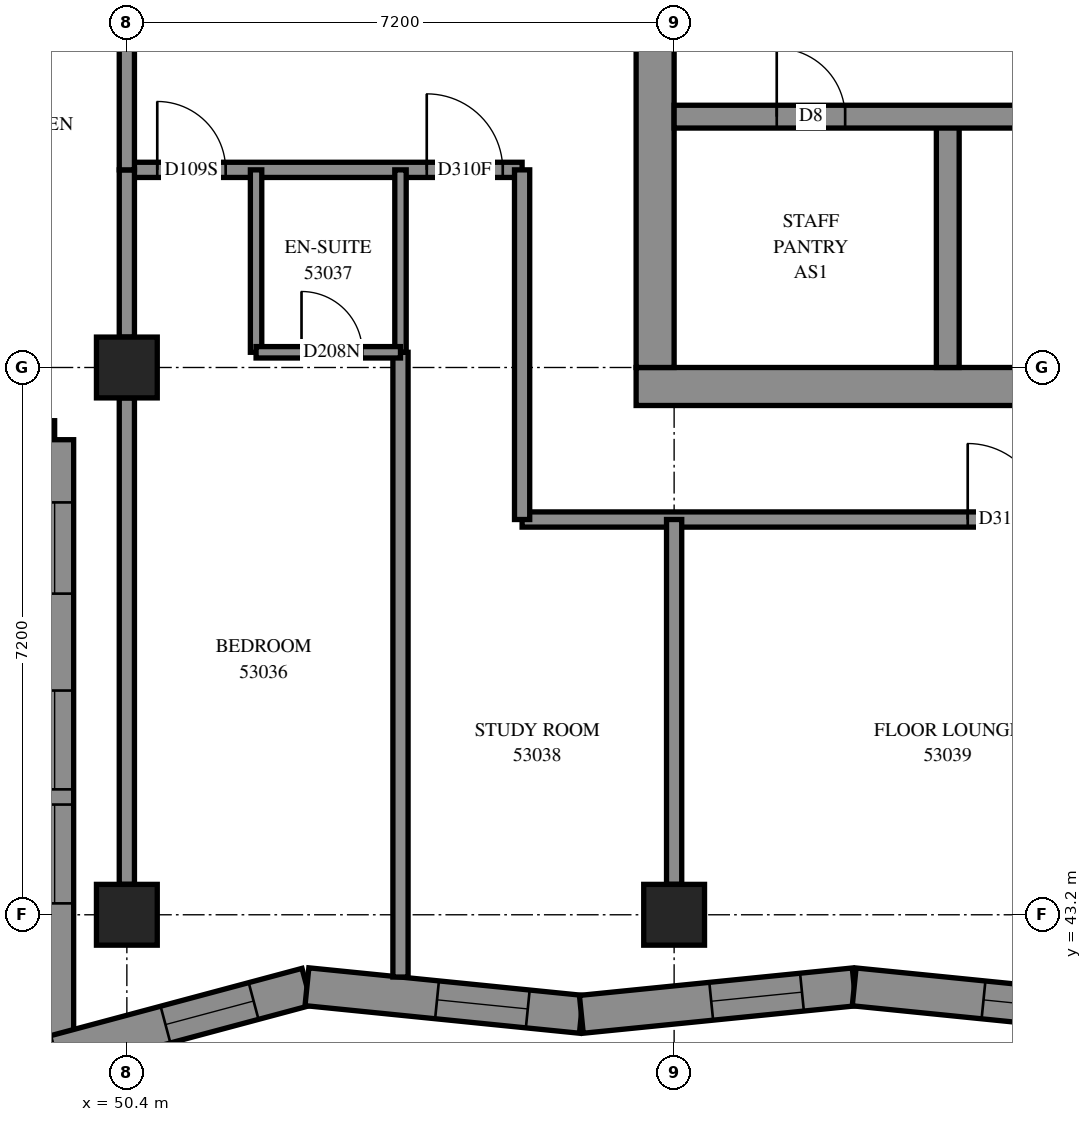
"""IFC4 building model, lengths in metres.
Left out: names, types, materials, properties, quantities, classifications, styles, units other than length and angle.
Written with IfcOpenShell. Run it as: python <this file> out.ifc"""

import sys

from ifc_helpers import new_model, si_unit, direction, frame, frame_2d, origin, origin_2d, place, context, subcontext, project, spatial, polyline, rectangle, outline, extrude, element, fill, save


model = new_model("IFC4")
c1 = context("Model", 3, precision=1e-05, world=origin(), true_north=direction((0.0, 1.0)))
c2 = subcontext(c1, "Body", "Model", "MODEL_VIEW")
j1 = project(units=[si_unit("LENGTHUNIT", "METRE"), si_unit("PLANEANGLEUNIT", "RADIAN")], contexts=[c1])
p1 = place(None, origin())
s1 = spatial("IfcSite", under=j1, at=p1, CompositionType="ELEMENT")
p2 = place(p1, origin())
s2 = spatial("IfcBuilding", under=s1, at=p2, CompositionType="ELEMENT")
p3 = place(p2, frame((0.0, 0.0, 196.4)))
s3 = spatial("IfcBuildingStorey", under=s2, at=p3, CompositionType="ELEMENT", Elevation=196.4)
for number, where, z_axis, x_axis in (
    (1, (50.4, 43.2, 0.0), (0.0, 0.0, 1.0), (1.0, 0.0, 0.0)),
    (2, (50.4, 50.4, 0.0), (0.0, 0.0, 1.0), (1.0, 0.0, 0.0)),
    (3, (57.6, 43.2, 0.0), (0.0, 0.0, 1.0), (1.0, 0.0, 0.0)),
):
    element("IfcColumn", number, at=place(p3, frame(where, z_axis=z_axis, x_axis=x_axis)), inside=s3, PredefinedType="COLUMN", context=c2, shape_type="SweptSolid", body=[
        extrude(rectangle(XDim=0.8, YDim=0.8, at=origin_2d()), origin(), (0.0, 0.0, 1.0), 3.1),
    ])
p4 = place(p3, frame((57.1, 50.15, -0.3), z_axis=(0.0, 0.0, 1.0), x_axis=(1.0, 0.0, 0.0)))
e4 = element("IfcWall", 4, at=p4, inside=s3, PredefinedType="SHEAR", context=c2, shape_type="SweptSolid", body=[
    extrude(rectangle(XDim=15.4, YDim=0.5, at=frame_2d((7.7, 0.0))), origin(), (0.0, 0.0, 1.0), 2.7),
])
p5 = place(p3, frame((57.35, 50.4, -0.3), z_axis=(0.0, 0.0, 1.0), x_axis=(0.0, 1.0, 0.0)))
e5 = element("IfcWall", 5, at=p5, inside=s3, PredefinedType="SHEAR", context=c2, shape_type="SweptSolid", body=[
    extrude(rectangle(XDim=14.4, YDim=0.5, at=frame_2d((7.2, 0.0))), origin(), (0.0, 0.0, 1.0), 2.7),
])
p6 = place(p5, frame((4.55, 0.0, 0.3)))
e6 = element("IfcOpeningElement", 6, at=p6, cuts=e5, PredefinedType="OPENING", context=c2, shape_type="SweptSolid", body=[
    extrude(rectangle(XDim=1.1, YDim=2.1, at=frame_2d((0.55, 1.05))), frame((0.0, 0.26, 0.0), z_axis=(0.0, -1.0, 0.0), x_axis=(1.0, 0.0, 0.0)), (0.0, 0.0, 1.0), 0.52),
])
p7 = place(p5, frame((11.35, 0.0, 0.3)))
e7 = element("IfcOpeningElement", 7, at=p7, cuts=e5, PredefinedType="OPENING", context=c2, shape_type="SweptSolid", body=[
    extrude(rectangle(XDim=1.1, YDim=2.1, at=frame_2d((0.55, 1.05))), frame((0.0, 0.26, 0.0), z_axis=(0.0, -1.0, 0.0), x_axis=(1.0, 0.0, 0.0)), (0.0, 0.0, 1.0), 0.52),
])
p8 = place(p3, frame((61.2, 50.4, 0.0), z_axis=(0.0, 0.0, 1.0), x_axis=(0.0, 1.0, 0.0)))
e8 = element("IfcWall", 8, at=p8, inside=s3, PredefinedType="SOLIDWALL", context=c2, shape_type="SweptSolid", body=[
    extrude(rectangle(XDim=3.3, YDim=0.3, at=frame_2d((1.65, 0.0))), origin(), (0.0, 0.0, 1.0), 3.1),
])
p9 = place(p3, frame((57.6, 53.7, 0.0), z_axis=(0.0, 0.0, 1.0), x_axis=(1.0, 0.0, 0.0)))
e9 = element("IfcWall", 9, at=p9, inside=s3, PredefinedType="SOLIDWALL", context=c2, shape_type="SweptSolid", body=[
    extrude(rectangle(XDim=14.4, YDim=0.3, at=frame_2d((7.2, 0.0))), origin(), (0.0, 0.0, 1.0), 3.1),
])
p10 = place(p9, frame((1.35, 0.0, 0.0)))
e10 = element("IfcOpeningElement", 10, at=p10, cuts=e9, PredefinedType="OPENING", context=c2, shape_type="SweptSolid", body=[
    extrude(rectangle(XDim=0.9, YDim=2.1, at=frame_2d((0.45, 1.05))), frame((0.0, 0.16, 0.0), z_axis=(0.0, -1.0, 0.0), x_axis=(1.0, 0.0, 0.0)), (0.0, 0.0, 1.0), 0.32),
])
p11 = place(p9, frame((4.95, 0.0, 0.0)))
e11 = element("IfcOpeningElement", 11, at=p11, cuts=e9, PredefinedType="OPENING", context=c2, shape_type="SweptSolid", body=[
    extrude(rectangle(XDim=0.9, YDim=2.1, at=frame_2d((0.45, 1.05))), frame((0.0, 0.16, 0.0), z_axis=(0.0, -1.0, 0.0), x_axis=(1.0, 0.0, 0.0)), (0.0, 0.0, 1.0), 0.32),
])
p12 = place(p9, frame((8.55, 0.0, 0.0)))
e12 = element("IfcOpeningElement", 12, at=p12, cuts=e9, PredefinedType="OPENING", context=c2, shape_type="SweptSolid", body=[
    extrude(rectangle(XDim=0.9, YDim=2.1, at=frame_2d((0.45, 1.05))), frame((0.0, 0.16, 0.0), z_axis=(0.0, -1.0, 0.0), x_axis=(1.0, 0.0, 0.0)), (0.0, 0.0, 1.0), 0.32),
])
p13 = place(p9, frame((12.05, 0.0, 0.0)))
e13 = element("IfcOpeningElement", 13, at=p13, cuts=e9, PredefinedType="OPENING", context=c2, shape_type="SweptSolid", body=[
    extrude(rectangle(XDim=1.1, YDim=2.1, at=frame_2d((0.55, 1.05))), frame((0.0, 0.16, 0.0), z_axis=(0.0, -1.0, 0.0), x_axis=(1.0, 0.0, 0.0)), (0.0, 0.0, 1.0), 0.32),
])
p14 = place(p3, frame((42.25, 49.45, 0.0), z_axis=(0.0, 0.0, 1.0), x_axis=(1.0, 0.0, 0.0)))
e14 = element("IfcWall", 14, at=p14, inside=s3, PredefinedType="SOLIDWALL", context=c2, shape_type="SweptSolid", body=[
    extrude(outline(polyline([(-0.25, -0.25), (6.95, -0.25), (7.45, 0.25), (0.25, 0.25), (-0.25, -0.25)])), origin(), (0.0, 0.0, 1.0), 3.1),
])
p15 = place(p14, frame((1.35, 0.0, 0.45)))
e15 = element("IfcOpeningElement", 15, at=p15, cuts=e14, PredefinedType="OPENING", context=c2, shape_type="SweptSolid", body=[
    extrude(rectangle(XDim=1.3, YDim=2.5, at=frame_2d((0.65, 1.25))), frame((0.0, 0.26, 0.0), z_axis=(0.0, -1.0, 0.0), x_axis=(1.0, 0.0, 0.0)), (0.0, 0.0, 1.0), 0.52),
])
p16 = place(p14, frame((2.85, 0.0, 0.45)))
e16 = element("IfcOpeningElement", 16, at=p16, cuts=e14, PredefinedType="OPENING", context=c2, shape_type="SweptSolid", body=[
    extrude(rectangle(XDim=1.3, YDim=2.5, at=frame_2d((0.65, 1.25))), frame((0.0, 0.26, 0.0), z_axis=(0.0, -1.0, 0.0), x_axis=(1.0, 0.0, 0.0)), (0.0, 0.0, 1.0), 0.52),
])
p17 = place(p14, frame((5.175, 0.0, 0.45)))
e17 = element("IfcOpeningElement", 17, at=p17, cuts=e14, PredefinedType="OPENING", context=c2, shape_type="SweptSolid", body=[
    extrude(rectangle(XDim=1.2, YDim=2.5, at=frame_2d((0.6, 1.25))), frame((0.0, 0.26, 0.0), z_axis=(0.0, -1.0, 0.0), x_axis=(1.0, 0.0, 0.0)), (0.0, 0.0, 1.0), 0.52),
])
p18 = place(p3, frame((49.45, 49.45, 0.0), z_axis=(0.0, 0.0, 1.0), x_axis=(0.0, -1.0, 0.0)))
e18 = element("IfcWall", 18, at=p18, inside=s3, PredefinedType="SOLIDWALL", context=c2, shape_type="SweptSolid", body=[
    extrude(outline(polyline([(0.25, -0.25), (8.411, -0.25), (7.76, 0.25), (-0.25, 0.25), (0.25, -0.25)])), origin(), (0.0, 0.0, 1.0), 3.1),
])
p19 = place(p18, frame((3.3, 0.0, 0.45)))
e19 = element("IfcOpeningElement", 19, at=p19, cuts=e18, PredefinedType="OPENING", context=c2, shape_type="SweptSolid", body=[
    extrude(rectangle(XDim=1.3, YDim=2.5, at=frame_2d((0.65, 1.25))), frame((0.0, 0.26, 0.0), z_axis=(0.0, -1.0, 0.0), x_axis=(1.0, 0.0, 0.0)), (0.0, 0.0, 1.0), 0.52),
])
p20 = place(p18, frame((4.8, 0.0, 0.45)))
e20 = element("IfcOpeningElement", 20, at=p20, cuts=e18, PredefinedType="OPENING", context=c2, shape_type="SweptSolid", body=[
    extrude(rectangle(XDim=1.3, YDim=2.5, at=frame_2d((0.65, 1.25))), frame((0.0, 0.26, 0.0), z_axis=(0.0, -1.0, 0.0), x_axis=(1.0, 0.0, 0.0)), (0.0, 0.0, 1.0), 0.52),
])
p21 = place(p18, frame((0.825, 0.0, 0.45)))
e21 = element("IfcOpeningElement", 21, at=p21, cuts=e18, PredefinedType="OPENING", context=c2, shape_type="SweptSolid", body=[
    extrude(rectangle(XDim=1.2, YDim=2.5, at=frame_2d((0.6, 1.25))), frame((0.0, 0.26, 0.0), z_axis=(0.0, -1.0, 0.0), x_axis=(1.0, 0.0, 0.0)), (0.0, 0.0, 1.0), 0.52),
])
p22 = place(p3, frame((49.45, 41.365, 0.0), z_axis=(0.0, 0.0, 1.0), x_axis=(0.9659803862, 0.2586153388, 0.0)))
e22 = element("IfcWall", 22, at=p22, inside=s3, PredefinedType="SOLIDWALL", context=c2, shape_type="SweptSolid", body=[
    extrude(outline(polyline([(-0.326, -0.25), (3.39, -0.25), (3.482, 0.25), (0.326, 0.25), (-0.326, -0.25)])), origin(), (0.0, 0.0, 1.0), 3.1),
])
p23 = place(p22, frame((1.51, 0.0, 0.45)))
e23 = element("IfcOpeningElement", 23, at=p23, cuts=e22, PredefinedType="OPENING", context=c2, shape_type="SweptSolid", body=[
    extrude(rectangle(XDim=1.2, YDim=2.5, at=frame_2d((0.6, 1.25))), frame((0.0, 0.26, 0.0), z_axis=(0.0, -1.0, 0.0), x_axis=(1.0, 0.0, 0.0)), (0.0, 0.0, 1.0), 0.52),
])
p24 = place(p3, frame((52.769, 42.253, 0.0), z_axis=(0.0, 0.0, 1.0), x_axis=(0.9949827385, -0.1000467394, 0.0)))
e24 = element("IfcWall", 24, at=p24, inside=s3, PredefinedType="SOLIDWALL", context=c2, shape_type="SweptSolid", body=[
    extrude(outline(polyline([(0.046, -0.25), (3.653, -0.25), (3.603, 0.25), (-0.046, 0.25), (0.046, -0.25)])), origin(), (0.0, 0.0, 1.0), 3.1),
])
p25 = place(p24, frame((1.72, 0.0, 0.45)))
e25 = element("IfcOpeningElement", 25, at=p25, cuts=e24, PredefinedType="OPENING", context=c2, shape_type="SweptSolid", body=[
    extrude(rectangle(XDim=1.2, YDim=2.5, at=frame_2d((0.6, 1.25))), frame((0.0, 0.26, 0.0), z_axis=(0.0, -1.0, 0.0), x_axis=(1.0, 0.0, 0.0)), (0.0, 0.0, 1.0), 0.52),
])
p26 = place(p3, frame((56.379, 41.89, 0.0), z_axis=(0.0, 0.0, 1.0), x_axis=(0.994981047, 0.1000635608, 0.0)))
e26 = element("IfcWall", 26, at=p26, inside=s3, PredefinedType="SOLIDWALL", context=c2, shape_type="SweptSolid", body=[
    extrude(outline(polyline([(-0.025, -0.25), (3.583, -0.25), (3.633, 0.25), (0.025, 0.25), (-0.025, -0.25)])), origin(), (0.0, 0.0, 1.0), 3.1),
])
p27 = place(p26, frame((1.717, 0.0, 0.45)))
e27 = element("IfcOpeningElement", 27, at=p27, cuts=e26, PredefinedType="OPENING", context=c2, shape_type="SweptSolid", body=[
    extrude(rectangle(XDim=1.2, YDim=2.5, at=frame_2d((0.6, 1.25))), frame((0.0, 0.26, 0.0), z_axis=(0.0, -1.0, 0.0), x_axis=(1.0, 0.0, 0.0)), (0.0, 0.0, 1.0), 0.52),
])
p28 = place(p3, frame((59.969, 42.251, 0.0), z_axis=(0.0, 0.0, 1.0), x_axis=(0.9949813245, -0.1000608012, 0.0)))
e28 = element("IfcWall", 28, at=p28, inside=s3, PredefinedType="SOLIDWALL", context=c2, shape_type="SweptSolid", body=[
    extrude(outline(polyline([(0.025, -0.25), (3.633, -0.25), (3.583, 0.25), (-0.025, 0.25), (0.025, -0.25)])), origin(), (0.0, 0.0, 1.0), 3.1),
])
p29 = place(p28, frame((1.71, 0.0, 0.45)))
e29 = element("IfcOpeningElement", 29, at=p29, cuts=e28, PredefinedType="OPENING", context=c2, shape_type="SweptSolid", body=[
    extrude(rectangle(XDim=1.2, YDim=2.5, at=frame_2d((0.6, 1.25))), frame((0.0, 0.26, 0.0), z_axis=(0.0, -1.0, 0.0), x_axis=(1.0, 0.0, 0.0)), (0.0, 0.0, 1.0), 0.52),
])
p30 = place(p3, frame((55.6, 48.4, 0.0), z_axis=(0.0, 0.0, 1.0), x_axis=(1.0, 0.0, 0.0)))
e30 = element("IfcWall", 30, at=p30, inside=s3, PredefinedType="PARTITIONING", context=c2, shape_type="SweptSolid", body=[
    extrude(rectangle(XDim=18.4, YDim=0.2, at=frame_2d((9.2, 0.0))), origin(), (0.0, 0.0, 1.0), 3.1),
])
p31 = place(p30, frame((5.862, 0.0, 0.0)))
e31 = element("IfcOpeningElement", 31, at=p31, cuts=e30, PredefinedType="OPENING", context=c2, shape_type="SweptSolid", body=[
    extrude(rectangle(XDim=1.0, YDim=2.1, at=frame_2d((0.5, 1.05))), frame((0.0, 0.11, 0.0), z_axis=(0.0, -1.0, 0.0), x_axis=(1.0, 0.0, 0.0)), (0.0, 0.0, 1.0), 0.22),
])
p32 = place(p30, frame((11.5, 0.0, 0.0)))
e32 = element("IfcOpeningElement", 32, at=p32, cuts=e30, PredefinedType="OPENING", context=c2, shape_type="SweptSolid", body=[
    extrude(rectangle(XDim=0.9, YDim=2.1, at=frame_2d((0.45, 1.05))), frame((0.0, 0.11, 0.0), z_axis=(0.0, -1.0, 0.0), x_axis=(1.0, 0.0, 0.0)), (0.0, 0.0, 1.0), 0.22),
])
p33 = place(p30, frame((13.2, 0.0, 0.0)))
e33 = element("IfcOpeningElement", 33, at=p33, cuts=e30, PredefinedType="OPENING", context=c2, shape_type="SweptSolid", body=[
    extrude(rectangle(XDim=0.9, YDim=2.1, at=frame_2d((0.45, 1.05))), frame((0.0, 0.11, 0.0), z_axis=(0.0, -1.0, 0.0), x_axis=(1.0, 0.0, 0.0)), (0.0, 0.0, 1.0), 0.22),
])
p34 = place(p3, frame((54.0, 42.381, 0.0), z_axis=(0.0, 0.0, 1.0), x_axis=(0.0, 1.0, 0.0)))
e34 = element("IfcWall", 34, at=p34, inside=s3, PredefinedType="PARTITIONING", context=c2, shape_type="SweptSolid", body=[
    extrude(rectangle(XDim=8.219, YDim=0.2, at=frame_2d((4.11, 0.0))), origin(), (0.0, 0.0, 1.0), 3.1),
])
p35 = place(p3, frame((50.4, 43.6, 0.0), z_axis=(0.0, 0.0, 1.0), x_axis=(0.0, 1.0, 0.0)))
e35 = element("IfcWall", 35, at=p35, inside=s3, PredefinedType="PARTITIONING", context=c2, shape_type="SweptSolid", body=[
    extrude(rectangle(XDim=6.4, YDim=0.2, at=frame_2d((3.2, 0.0))), origin(), (0.0, 0.0, 1.0), 2.6),
])
p36 = place(p3, frame((50.4, 53.0, 0.0), z_axis=(0.0, 0.0, 1.0), x_axis=(1.0, 0.0, 0.0)))
e36 = element("IfcWall", 36, at=p36, inside=s3, PredefinedType="PARTITIONING", context=c2, shape_type="SweptSolid", body=[
    extrude(rectangle(XDim=5.2, YDim=0.2, at=frame_2d((2.6, 0.0))), origin(), (0.0, 0.0, 1.0), 3.1),
])
p37 = place(p36, frame((0.4, 0.0, 0.0)))
e37 = element("IfcOpeningElement", 37, at=p37, cuts=e36, PredefinedType="OPENING", context=c2, shape_type="SweptSolid", body=[
    extrude(rectangle(XDim=0.9, YDim=2.1, at=frame_2d((0.45, 1.05))), frame((0.0, 0.11, 0.0), z_axis=(0.0, -1.0, 0.0), x_axis=(1.0, 0.0, 0.0)), (0.0, 0.0, 1.0), 0.22),
])
p38 = place(p36, frame((3.946, 0.0, 0.0)))
e38 = element("IfcOpeningElement", 38, at=p38, cuts=e36, PredefinedType="OPENING", context=c2, shape_type="SweptSolid", body=[
    extrude(rectangle(XDim=1.0, YDim=2.1, at=frame_2d((0.5, 1.05))), frame((0.0, 0.11, 0.0), z_axis=(0.0, -1.0, 0.0), x_axis=(1.0, 0.0, 0.0)), (0.0, 0.0, 1.0), 0.22),
])
p39 = place(p3, frame((57.6, 43.6, 0.0), z_axis=(0.0, 0.0, 1.0), x_axis=(0.0, 1.0, 0.0)))
e39 = element("IfcWall", 39, at=p39, inside=s3, PredefinedType="PARTITIONING", context=c2, shape_type="SweptSolid", body=[
    extrude(rectangle(XDim=4.8, YDim=0.2, at=frame_2d((2.4, 0.0))), origin(), (0.0, 0.0, 1.0), 3.1),
])
p40 = place(p3, frame((55.6, 48.4, 0.0), z_axis=(0.0, 0.0, 1.0), x_axis=(0.0, 1.0, 0.0)))
e40 = element("IfcWall", 40, at=p40, inside=s3, PredefinedType="PARTITIONING", context=c2, shape_type="SweptSolid", body=[
    extrude(rectangle(XDim=4.6, YDim=0.2, at=frame_2d((2.3, 0.0))), origin(), (0.0, 0.0, 1.0), 3.1),
])
for number, where, z_axis, x_axis in (
    (41, (52.1, 50.6, 0.0), (0.0, 0.0, 1.0), (0.0, 1.0, 0.0)),
    (42, (54.0, 50.6, 0.0), (0.0, 0.0, 1.0), (0.0, 1.0, 0.0)),
):
    element("IfcWall", number, at=place(p3, frame(where, z_axis=z_axis, x_axis=x_axis)), inside=s3, PredefinedType="PARTITIONING", context=c2, shape_type="SweptSolid", body=[
        extrude(rectangle(XDim=2.4, YDim=0.15, at=frame_2d((1.2, 0.0))), origin(), (0.0, 0.0, 1.0), 3.1),
    ])
p41 = place(p3, frame((50.4, 50.8, 0.0), z_axis=(0.0, 0.0, 1.0), x_axis=(0.0, 1.0, 0.0)))
e43 = element("IfcWall", 43, at=p41, inside=s3, PredefinedType="PARTITIONING", context=c2, shape_type="SweptSolid", body=[
    extrude(rectangle(XDim=2.2, YDim=0.2, at=frame_2d((1.1, 0.0))), origin(), (0.0, 0.0, 1.0), 3.1),
])
p42 = place(p3, frame((50.4, 53.0, 0.0), z_axis=(0.0, 0.0, 1.0), x_axis=(0.0, 1.0, 0.0)))
e44 = element("IfcWall", 44, at=p42, inside=s3, PredefinedType="PARTITIONING", context=c2, shape_type="SweptSolid", body=[
    extrude(rectangle(XDim=2.0, YDim=0.2, at=frame_2d((1.0, 0.0))), origin(), (0.0, 0.0, 1.0), 3.1),
])
p43 = place(p3, frame((52.1, 50.6, 0.0), z_axis=(0.0, 0.0, 1.0), x_axis=(1.0, 0.0, 0.0)))
e45 = element("IfcWall", 45, at=p43, inside=s3, PredefinedType="PARTITIONING", context=c2, shape_type="SweptSolid", body=[
    extrude(rectangle(XDim=1.9, YDim=0.15, at=frame_2d((0.95, 0.0))), origin(), (0.0, 0.0, 1.0), 3.1),
])
p44 = place(p43, frame((0.598, 0.0, 0.0)))
e46 = element("IfcOpeningElement", 46, at=p44, cuts=e45, PredefinedType="OPENING", context=c2, shape_type="SweptSolid", body=[
    extrude(rectangle(XDim=0.8, YDim=2.1, at=frame_2d((0.4, 1.05))), frame((0.0, 0.085, 0.0), z_axis=(0.0, -1.0, 0.0), x_axis=(1.0, 0.0, 0.0)), (0.0, 0.0, 1.0), 0.17),
])
p45 = place(p19, origin())
e47 = element("IfcWindow", 47, at=p45, inside=s3, PartitioningType="SINGLE_PANEL", PredefinedType="WINDOW", context=c2, shape_type="SweptSolid", body=[
    extrude(rectangle(XDim=1.3, YDim=2.5, at=frame_2d((0.65, 1.25))), frame((0.0, 0.18, 0.0), z_axis=(0.0, -1.0, 0.0), x_axis=(1.0, 0.0, 0.0)), (0.0, 0.0, 1.0), 0.06),
])
fill(e19, e47)
p46 = place(p20, origin())
e48 = element("IfcWindow", 48, at=p46, inside=s3, PartitioningType="SINGLE_PANEL", PredefinedType="WINDOW", context=c2, shape_type="SweptSolid", body=[
    extrude(rectangle(XDim=1.3, YDim=2.5, at=frame_2d((0.65, 1.25))), frame((0.0, 0.18, 0.0), z_axis=(0.0, -1.0, 0.0), x_axis=(1.0, 0.0, 0.0)), (0.0, 0.0, 1.0), 0.06),
])
fill(e20, e48)
p47 = place(p21, origin())
e49 = element("IfcWindow", 49, at=p47, inside=s3, PartitioningType="SINGLE_PANEL", PredefinedType="WINDOW", context=c2, shape_type="SweptSolid", body=[
    extrude(rectangle(XDim=1.2, YDim=2.5, at=frame_2d((0.6, 1.25))), frame((0.0, 0.18, 0.0), z_axis=(0.0, -1.0, 0.0), x_axis=(1.0, 0.0, 0.0)), (0.0, 0.0, 1.0), 0.06),
])
fill(e21, e49)
p48 = place(p23, origin())
e50 = element("IfcWindow", 50, at=p48, inside=s3, PartitioningType="SINGLE_PANEL", PredefinedType="WINDOW", context=c2, shape_type="SweptSolid", body=[
    extrude(rectangle(XDim=1.2, YDim=2.5, at=frame_2d((0.6, 1.25))), frame((0.0, 0.18, 0.0), z_axis=(0.0, -1.0, 0.0), x_axis=(1.0, 0.0, 0.0)), (0.0, 0.0, 1.0), 0.06),
])
fill(e23, e50)
p49 = place(p25, origin())
e51 = element("IfcWindow", 51, at=p49, inside=s3, PartitioningType="SINGLE_PANEL", PredefinedType="WINDOW", context=c2, shape_type="SweptSolid", body=[
    extrude(rectangle(XDim=1.2, YDim=2.5, at=frame_2d((0.6, 1.25))), frame((0.0, 0.18, 0.0), z_axis=(0.0, -1.0, 0.0), x_axis=(1.0, 0.0, 0.0)), (0.0, 0.0, 1.0), 0.06),
])
fill(e25, e51)
p50 = place(p27, origin())
e52 = element("IfcWindow", 52, at=p50, inside=s3, PartitioningType="SINGLE_PANEL", PredefinedType="WINDOW", context=c2, shape_type="SweptSolid", body=[
    extrude(rectangle(XDim=1.2, YDim=2.5, at=frame_2d((0.6, 1.25))), frame((0.0, 0.18, 0.0), z_axis=(0.0, -1.0, 0.0), x_axis=(1.0, 0.0, 0.0)), (0.0, 0.0, 1.0), 0.06),
])
fill(e27, e52)
p51 = place(p29, origin())
e53 = element("IfcWindow", 53, at=p51, inside=s3, PartitioningType="SINGLE_PANEL", PredefinedType="WINDOW", context=c2, shape_type="SweptSolid", body=[
    extrude(rectangle(XDim=1.2, YDim=2.5, at=frame_2d((0.6, 1.25))), frame((0.0, 0.18, 0.0), z_axis=(0.0, -1.0, 0.0), x_axis=(1.0, 0.0, 0.0)), (0.0, 0.0, 1.0), 0.06),
])
fill(e29, e53)
p52 = place(p10, origin())
e54 = element("IfcDoor", 54, at=p52, inside=s3, OperationType="SINGLE_SWING_LEFT", PredefinedType="DOOR", context=c2, shape_type="SweptSolid", body=[
    extrude(rectangle(XDim=0.9, YDim=2.1, at=frame_2d((0.45, 1.05))), frame((0.0, 0.025, 0.0), z_axis=(0.0, -1.0, 0.0), x_axis=(1.0, 0.0, 0.0)), (0.0, 0.0, 1.0), 0.05),
])
fill(e10, e54)
p53 = place(p37, origin())
e55 = element("IfcDoor", 55, at=p53, inside=s3, OperationType="SINGLE_SWING_LEFT", PredefinedType="DOOR", context=c2, shape_type="SweptSolid", body=[
    extrude(rectangle(XDim=0.9, YDim=2.1, at=frame_2d((0.45, 1.05))), frame((0.0, 0.025, 0.0), z_axis=(0.0, -1.0, 0.0), x_axis=(1.0, 0.0, 0.0)), (0.0, 0.0, 1.0), 0.05),
])
fill(e37, e55)
p54 = place(p44, origin())
e56 = element("IfcDoor", 56, at=p54, inside=s3, OperationType="SINGLE_SWING_RIGHT", PredefinedType="DOOR", context=c2, shape_type="SweptSolid", body=[
    extrude(rectangle(XDim=0.8, YDim=2.1, at=frame_2d((0.4, 1.05))), frame((0.0, 0.025, 0.0), z_axis=(0.0, -1.0, 0.0), x_axis=(1.0, 0.0, 0.0)), (0.0, 0.0, 1.0), 0.05),
])
fill(e46, e56)
p55 = place(p38, origin())
e57 = element("IfcDoor", 57, at=p55, inside=s3, OperationType="SINGLE_SWING_RIGHT", PredefinedType="DOOR", context=c2, shape_type="SweptSolid", body=[
    extrude(rectangle(XDim=1.0, YDim=2.1, at=frame_2d((0.5, 1.05))), frame((0.0, 0.025, 0.0), z_axis=(0.0, -1.0, 0.0), x_axis=(1.0, 0.0, 0.0)), (0.0, 0.0, 1.0), 0.05),
])
fill(e38, e57)
p56 = place(p31, origin())
e58 = element("IfcDoor", 58, at=p56, inside=s3, OperationType="SINGLE_SWING_LEFT", PredefinedType="DOOR", context=c2, shape_type="SweptSolid", body=[
    extrude(rectangle(XDim=1.0, YDim=2.1, at=frame_2d((0.5, 1.05))), frame((0.0, 0.025, 0.0), z_axis=(0.0, -1.0, 0.0), x_axis=(1.0, 0.0, 0.0)), (0.0, 0.0, 1.0), 0.05),
])
fill(e31, e58)
save(model, sys.argv[1])
